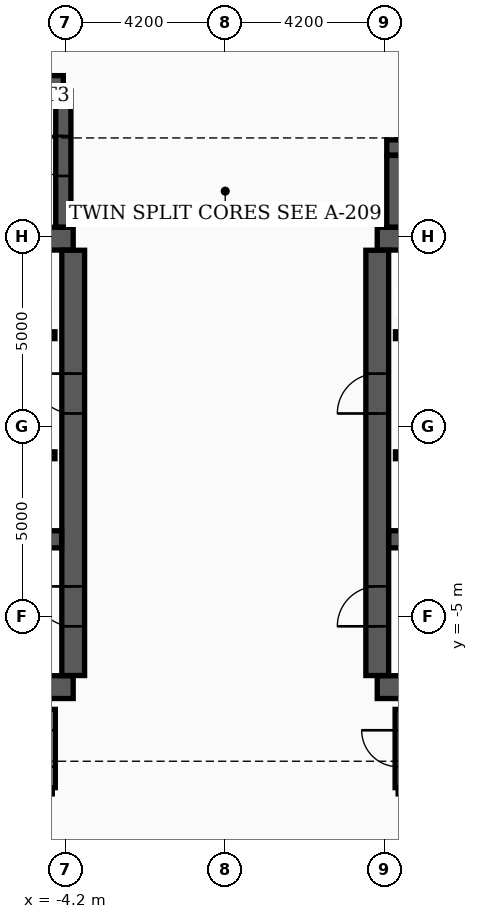
"""IFC4 building model, lengths in metres.
Left out: names, types, materials, properties, quantities, classifications, styles, units other than length and angle.
Written with IfcOpenShell. Run it as: python <this file> out.ifc"""

import sys

from ifc_helpers import new_model, si_unit, direction, frame, frame_2d, origin, place, context, subcontext, project, spatial, rectangle, extrude, element, fill, save


model = new_model("IFC4")
c1 = context("Model", 3, precision=1e-05, world=origin(), true_north=direction((0.0, 1.0)))
c2 = subcontext(c1, "Body", "Model", "MODEL_VIEW")
j1 = project(units=[si_unit("LENGTHUNIT", "METRE"), si_unit("PLANEANGLEUNIT", "RADIAN")], contexts=[c1])
p1 = place(None, origin())
s1 = spatial("IfcSite", under=j1, at=p1, CompositionType="ELEMENT")
p2 = place(p1, origin())
s2 = spatial("IfcBuilding", under=s1, at=p2, CompositionType="ELEMENT")
p3 = place(p2, frame((0.0, 0.0, 183.9)))
s3 = spatial("IfcBuildingStorey", under=s2, at=p3, CompositionType="ELEMENT", Elevation=183.9)
for number, where, z_axis, x_axis in (
    (1, (-12.4, -6.85, 0.0), (0.0, 0.0, 1.0), (1.0, 0.0, 0.0)),
    (2, (-12.4, 4.95, 0.0), (0.0, 0.0, 1.0), (1.0, 0.0, 0.0)),
):
    element("IfcWall", number, at=place(p3, frame(where, z_axis=z_axis, x_axis=x_axis)), inside=s3, PredefinedType="SHEAR", context=c2, shape_type="SweptSolid", body=[
        extrude(rectangle(XDim=8.4, YDim=0.6, at=frame_2d((4.2, 0.0))), origin(), (0.0, 0.0, 1.0), 3.7),
    ])
p4 = place(p3, frame((-4.0, -6.545, 0.0), z_axis=(0.0, 0.0, 1.0), x_axis=(0.0, 1.0, 0.0)))
e3 = element("IfcWall", 3, at=p4, inside=s3, PredefinedType="SHEAR", context=c2, shape_type="SweptSolid", body=[
    extrude(rectangle(XDim=11.19, YDim=0.6, at=frame_2d((5.595, 0.0))), origin(), (0.0, 0.0, 1.0), 3.7),
])
p5 = place(p4, frame((1.295, 0.0, 0.0)))
e4 = element("IfcOpeningElement", 4, at=p5, cuts=e3, PredefinedType="OPENING", context=c2, shape_type="SweptSolid", body=[
    extrude(rectangle(XDim=1.05, YDim=2.15, at=frame_2d((0.525, 1.075))), frame((0.0, 0.31, 0.0), z_axis=(0.0, -1.0, 0.0), x_axis=(1.0, 0.0, 0.0)), (0.0, 0.0, 1.0), 0.62),
])
p6 = place(p4, frame((6.895, 0.0, 0.0)))
e5 = element("IfcOpeningElement", 5, at=p6, cuts=e3, PredefinedType="OPENING", context=c2, shape_type="SweptSolid", body=[
    extrude(rectangle(XDim=1.05, YDim=2.15, at=frame_2d((0.525, 1.075))), frame((0.0, 0.31, 0.0), z_axis=(0.0, -1.0, 0.0), x_axis=(1.0, 0.0, 0.0)), (0.0, 0.0, 1.0), 0.62),
])
p7 = place(p3, frame((-12.095, -2.96, 0.0), z_axis=(0.0, 0.0, 1.0), x_axis=(1.0, 0.0, 0.0)))
e6 = element("IfcWall", 6, at=p7, inside=s3, PredefinedType="SHEAR", context=c2, shape_type="SweptSolid", body=[
    extrude(rectangle(XDim=7.79, YDim=0.45, at=frame_2d((3.895, 0.0))), origin(), (0.0, 0.0, 1.0), 3.7),
])
for number, where, z_axis, x_axis in (
    (7, (4.0, -6.85, 0.0), (0.0, 0.0, 1.0), (1.0, 0.0, 0.0)),
    (8, (4.0, 4.95, 0.0), (0.0, 0.0, 1.0), (1.0, 0.0, 0.0)),
):
    element("IfcWall", number, at=place(p3, frame(where, z_axis=z_axis, x_axis=x_axis)), inside=s3, PredefinedType="SHEAR", context=c2, shape_type="SweptSolid", body=[
        extrude(rectangle(XDim=8.4, YDim=0.6, at=frame_2d((4.2, 0.0))), origin(), (0.0, 0.0, 1.0), 3.7),
    ])
p8 = place(p3, frame((4.0, -6.545, 0.0), z_axis=(0.0, 0.0, 1.0), x_axis=(0.0, 1.0, 0.0)))
e9 = element("IfcWall", 9, at=p8, inside=s3, PredefinedType="SHEAR", context=c2, shape_type="SweptSolid", body=[
    extrude(rectangle(XDim=11.19, YDim=0.6, at=frame_2d((5.595, 0.0))), origin(), (0.0, 0.0, 1.0), 3.7),
])
p9 = place(p8, frame((1.295, 0.0, 0.0)))
e10 = element("IfcOpeningElement", 10, at=p9, cuts=e9, PredefinedType="OPENING", context=c2, shape_type="SweptSolid", body=[
    extrude(rectangle(XDim=1.05, YDim=2.15, at=frame_2d((0.525, 1.075))), frame((0.0, 0.31, 0.0), z_axis=(0.0, -1.0, 0.0), x_axis=(1.0, 0.0, 0.0)), (0.0, 0.0, 1.0), 0.62),
])
p10 = place(p8, frame((6.895, 0.0, 0.0)))
e11 = element("IfcOpeningElement", 11, at=p10, cuts=e9, PredefinedType="OPENING", context=c2, shape_type="SweptSolid", body=[
    extrude(rectangle(XDim=1.05, YDim=2.15, at=frame_2d((0.525, 1.075))), frame((0.0, 0.31, 0.0), z_axis=(0.0, -1.0, 0.0), x_axis=(1.0, 0.0, 0.0)), (0.0, 0.0, 1.0), 0.62),
])
p11 = place(p3, frame((4.305, -2.96, 0.0), z_axis=(0.0, 0.0, 1.0), x_axis=(1.0, 0.0, 0.0)))
e12 = element("IfcWall", 12, at=p11, inside=s3, PredefinedType="SHEAR", context=c2, shape_type="SweptSolid", body=[
    extrude(rectangle(XDim=7.79, YDim=0.45, at=frame_2d((3.895, 0.0))), origin(), (0.0, 0.0, 1.0), 3.7),
])
p12 = place(p3, frame((-12.22, 9.04, 0.0), z_axis=(0.0, 0.0, 1.0), x_axis=(1.0, 0.0, 0.0)))
e13 = element("IfcWall", 13, at=p12, inside=s3, PredefinedType="SHEAR", context=c2, shape_type="SweptSolid", body=[
    extrude(rectangle(XDim=7.96, YDim=0.4, at=frame_2d((3.98, 0.0))), origin(), (0.0, 0.0, 1.0), 3.7),
])
p13 = place(p3, frame((-4.26, 5.255, 0.0), z_axis=(0.0, 0.0, 1.0), x_axis=(0.0, 1.0, 0.0)))
e14 = element("IfcWall", 14, at=p13, inside=s3, PredefinedType="SHEAR", context=c2, shape_type="SweptSolid", body=[
    extrude(rectangle(XDim=3.58, YDim=0.4, at=frame_2d((1.79, 0.0))), origin(), (0.0, 0.0, 1.0), 3.7),
])
p14 = place(p13, frame((1.345, 0.0, 0.0)))
e15 = element("IfcOpeningElement", 15, at=p14, cuts=e14, PredefinedType="OPENING", context=c2, shape_type="SweptSolid", body=[
    extrude(rectangle(XDim=1.05, YDim=2.15, at=frame_2d((0.525, 1.075))), frame((0.0, 0.21, 0.0), z_axis=(0.0, -1.0, 0.0), x_axis=(1.0, 0.0, 0.0)), (0.0, 0.0, 1.0), 0.42),
])
p15 = place(p3, frame((4.45, 5.255, 0.0), z_axis=(0.0, 0.0, 1.0), x_axis=(0.0, 1.0, 0.0)))
e16 = element("IfcWall", 16, at=p15, inside=s3, PredefinedType="SHEAR", context=c2, shape_type="SweptSolid", body=[
    extrude(rectangle(XDim=1.885, YDim=0.4, at=frame_2d((0.942, 0.0))), origin(), (0.0, 0.0, 1.0), 3.7),
])
p16 = place(p3, frame((4.25, 7.35, 0.0), z_axis=(0.0, 0.0, 1.0), x_axis=(1.0, 0.0, 0.0)))
e17 = element("IfcWall", 17, at=p16, inside=s3, PredefinedType="SHEAR", context=c2, shape_type="SweptSolid", body=[
    extrude(rectangle(XDim=5.4, YDim=0.4, at=frame_2d((2.7, 0.0))), origin(), (0.0, 0.0, 1.0), 3.7),
])
p17 = place(p3, frame((-11.9, 2.41, 0.0), z_axis=(0.0, 0.0, 1.0), x_axis=(1.0, 0.0, 0.0)))
e18 = element("IfcWall", 18, at=p17, inside=s3, PredefinedType="SOLIDWALL", context=c2, shape_type="SweptSolid", body=[
    extrude(rectangle(XDim=7.42, YDim=0.18, at=frame_2d((3.71, 0.0))), origin(), (0.0, 0.0, 1.0), 2.96),
])
p18 = place(p17, frame((0.55, 0.0, 0.0)))
e19 = element("IfcOpeningElement", 19, at=p18, cuts=e18, PredefinedType="OPENING", context=c2, shape_type="SweptSolid", body=[
    extrude(rectangle(XDim=1.1, YDim=2.15, at=frame_2d((0.55, 1.075))), frame((0.0, 0.1, 0.0), z_axis=(0.0, -1.0, 0.0), x_axis=(1.0, 0.0, 0.0)), (0.0, 0.0, 1.0), 0.2),
])
p19 = place(p17, frame((4.9, 0.0, 0.0)))
e20 = element("IfcOpeningElement", 20, at=p19, cuts=e18, PredefinedType="OPENING", context=c2, shape_type="SweptSolid", body=[
    extrude(rectangle(XDim=0.88, YDim=2.1, at=frame_2d((0.44, 1.05))), frame((0.0, 0.1, 0.0), z_axis=(0.0, -1.0, 0.0), x_axis=(1.0, 0.0, 0.0)), (0.0, 0.0, 1.0), 0.2),
])
p20 = place(p3, frame((4.48, 2.41, 0.0), z_axis=(0.0, 0.0, 1.0), x_axis=(1.0, 0.0, 0.0)))
e21 = element("IfcWall", 21, at=p20, inside=s3, PredefinedType="SOLIDWALL", context=c2, shape_type="SweptSolid", body=[
    extrude(rectangle(XDim=7.42, YDim=0.18, at=frame_2d((3.71, 0.0))), origin(), (0.0, 0.0, 1.0), 2.96),
])
p21 = place(p20, frame((5.67, 0.0, 0.0)))
e22 = element("IfcOpeningElement", 22, at=p21, cuts=e21, PredefinedType="OPENING", context=c2, shape_type="SweptSolid", body=[
    extrude(rectangle(XDim=1.1, YDim=2.15, at=frame_2d((0.55, 1.075))), frame((0.0, 0.1, 0.0), z_axis=(0.0, -1.0, 0.0), x_axis=(1.0, 0.0, 0.0)), (0.0, 0.0, 1.0), 0.2),
])
p22 = place(p20, frame((1.6, 0.0, 0.0)))
e23 = element("IfcOpeningElement", 23, at=p22, cuts=e21, PredefinedType="OPENING", context=c2, shape_type="SweptSolid", body=[
    extrude(rectangle(XDim=0.88, YDim=2.1, at=frame_2d((0.44, 1.05))), frame((0.0, 0.1, 0.0), z_axis=(0.0, -1.0, 0.0), x_axis=(1.0, 0.0, 0.0)), (0.0, 0.0, 1.0), 0.2),
])
p23 = place(p3, frame((-11.9, -0.75, 0.0), z_axis=(0.0, 0.0, 1.0), x_axis=(1.0, 0.0, 0.0)))
e24 = element("IfcWall", 24, at=p23, inside=s3, PredefinedType="SOLIDWALL", context=c2, shape_type="SweptSolid", body=[
    extrude(rectangle(XDim=7.42, YDim=0.18, at=frame_2d((3.71, 0.0))), origin(), (0.0, 0.0, 1.0), 2.96),
])
p24 = place(p23, frame((0.45, 0.0, 0.0)))
e25 = element("IfcOpeningElement", 25, at=p24, cuts=e24, PredefinedType="OPENING", context=c2, shape_type="SweptSolid", body=[
    extrude(rectangle(XDim=1.1, YDim=2.15, at=frame_2d((0.55, 1.075))), frame((0.0, 0.1, 0.0), z_axis=(0.0, -1.0, 0.0), x_axis=(1.0, 0.0, 0.0)), (0.0, 0.0, 1.0), 0.2),
])
p25 = place(p23, frame((2.35, 0.0, 0.0)))
e26 = element("IfcOpeningElement", 26, at=p25, cuts=e24, PredefinedType="OPENING", context=c2, shape_type="SweptSolid", body=[
    extrude(rectangle(XDim=1.1, YDim=2.15, at=frame_2d((0.55, 1.075))), frame((0.0, 0.1, 0.0), z_axis=(0.0, -1.0, 0.0), x_axis=(1.0, 0.0, 0.0)), (0.0, 0.0, 1.0), 0.2),
])
p26 = place(p3, frame((4.48, -0.75, 0.0), z_axis=(0.0, 0.0, 1.0), x_axis=(1.0, 0.0, 0.0)))
e27 = element("IfcWall", 27, at=p26, inside=s3, PredefinedType="SOLIDWALL", context=c2, shape_type="SweptSolid", body=[
    extrude(rectangle(XDim=7.42, YDim=0.18, at=frame_2d((3.71, 0.0))), origin(), (0.0, 0.0, 1.0), 2.96),
])
p27 = place(p26, frame((0.52, 0.0, 0.0)))
e28 = element("IfcOpeningElement", 28, at=p27, cuts=e27, PredefinedType="OPENING", context=c2, shape_type="SweptSolid", body=[
    extrude(rectangle(XDim=1.1, YDim=2.15, at=frame_2d((0.55, 1.075))), frame((0.0, 0.1, 0.0), z_axis=(0.0, -1.0, 0.0), x_axis=(1.0, 0.0, 0.0)), (0.0, 0.0, 1.0), 0.2),
])
p28 = place(p3, frame((4.55, -9.58, 0.0), z_axis=(0.0, 0.0, 1.0), x_axis=(1.0, 0.0, 0.0)))
e29 = element("IfcWall", 29, at=p28, inside=s3, PredefinedType="PARTITIONING", context=c2, shape_type="SweptSolid", body=[
    extrude(rectangle(XDim=8.1, YDim=0.16, at=frame_2d((4.05, 0.0))), origin(), (0.0, 0.0, 1.0), 2.96),
])
p29 = place(p3, frame((4.55, -9.495, 0.0), z_axis=(0.0, 0.0, 1.0), x_axis=(0.0, 1.0, 0.0)))
e30 = element("IfcWall", 30, at=p29, inside=s3, PredefinedType="PARTITIONING", context=c2, shape_type="SweptSolid", body=[
    extrude(rectangle(XDim=2.06, YDim=0.16, at=frame_2d((1.03, 0.0))), origin(), (0.0, 0.0, 1.0), 2.96),
])
p30 = place(p29, frame((0.55, 0.0, 0.0)))
e31 = element("IfcOpeningElement", 31, at=p30, cuts=e30, PredefinedType="OPENING", context=c2, shape_type="SweptSolid", body=[
    extrude(rectangle(XDim=0.96, YDim=2.15, at=frame_2d((0.48, 1.075))), frame((0.0, 0.09, 0.0), z_axis=(0.0, -1.0, 0.0), x_axis=(1.0, 0.0, 0.0)), (0.0, 0.0, 1.0), 0.18),
])
p31 = place(p3, frame((-4.55, -9.495, 0.0), z_axis=(0.0, 0.0, 1.0), x_axis=(0.0, 1.0, 0.0)))
e32 = element("IfcWall", 32, at=p31, inside=s3, PredefinedType="PARTITIONING", context=c2, shape_type="SweptSolid", body=[
    extrude(rectangle(XDim=2.06, YDim=0.16, at=frame_2d((1.03, 0.0))), origin(), (0.0, 0.0, 1.0), 2.96),
])
p32 = place(p31, frame((0.55, 0.0, 0.0)))
e33 = element("IfcOpeningElement", 33, at=p32, cuts=e32, PredefinedType="OPENING", context=c2, shape_type="SweptSolid", body=[
    extrude(rectangle(XDim=0.96, YDim=2.15, at=frame_2d((0.48, 1.075))), frame((0.0, 0.09, 0.0), z_axis=(0.0, -1.0, 0.0), x_axis=(1.0, 0.0, 0.0)), (0.0, 0.0, 1.0), 0.18),
])
p33 = place(p5, origin())
e34 = element("IfcDoor", 34, at=p33, inside=s3, OperationType="SINGLE_SWING_RIGHT", PredefinedType="DOOR", context=c2, shape_type="SweptSolid", body=[
    extrude(rectangle(XDim=1.05, YDim=2.15, at=frame_2d((0.525, 1.075))), frame((0.0, 0.025, 0.0), z_axis=(0.0, -1.0, 0.0), x_axis=(1.0, 0.0, 0.0)), (0.0, 0.0, 1.0), 0.05),
])
fill(e4, e34)
p34 = place(p9, origin())
e35 = element("IfcDoor", 35, at=p34, inside=s3, OperationType="SINGLE_SWING_LEFT", PredefinedType="DOOR", context=c2, shape_type="SweptSolid", body=[
    extrude(rectangle(XDim=1.05, YDim=2.15, at=frame_2d((0.525, 1.075))), frame((0.0, 0.025, 0.0), z_axis=(0.0, -1.0, 0.0), x_axis=(1.0, 0.0, 0.0)), (0.0, 0.0, 1.0), 0.05),
])
fill(e10, e35)
p35 = place(p6, origin())
e36 = element("IfcDoor", 36, at=p35, inside=s3, OperationType="SINGLE_SWING_RIGHT", PredefinedType="DOOR", context=c2, shape_type="SweptSolid", body=[
    extrude(rectangle(XDim=1.05, YDim=2.15, at=frame_2d((0.525, 1.075))), frame((0.0, 0.025, 0.0), z_axis=(0.0, -1.0, 0.0), x_axis=(1.0, 0.0, 0.0)), (0.0, 0.0, 1.0), 0.05),
])
fill(e5, e36)
p36 = place(p10, origin())
e37 = element("IfcDoor", 37, at=p36, inside=s3, OperationType="SINGLE_SWING_LEFT", PredefinedType="DOOR", context=c2, shape_type="SweptSolid", body=[
    extrude(rectangle(XDim=1.05, YDim=2.15, at=frame_2d((0.525, 1.075))), frame((0.0, 0.025, 0.0), z_axis=(0.0, -1.0, 0.0), x_axis=(1.0, 0.0, 0.0)), (0.0, 0.0, 1.0), 0.05),
])
fill(e11, e37)
p37 = place(p14, origin())
e38 = element("IfcDoor", 38, at=p37, inside=s3, OperationType="SINGLE_SWING_RIGHT", PredefinedType="DOOR", context=c2, shape_type="SweptSolid", body=[
    extrude(rectangle(XDim=1.05, YDim=2.15, at=frame_2d((0.525, 1.075))), frame((0.0, 0.025, 0.0), z_axis=(0.0, -1.0, 0.0), x_axis=(1.0, 0.0, 0.0)), (0.0, 0.0, 1.0), 0.05),
])
fill(e15, e38)
p38 = place(p30, origin())
e39 = element("IfcDoor", 39, at=p38, inside=s3, OperationType="SINGLE_SWING_RIGHT", PredefinedType="DOOR", context=c2, shape_type="SweptSolid", body=[
    extrude(rectangle(XDim=0.96, YDim=2.15, at=frame_2d((0.48, 1.075))), frame((0.0, 0.025, 0.0), z_axis=(0.0, -1.0, 0.0), x_axis=(1.0, 0.0, 0.0)), (0.0, 0.0, 1.0), 0.05),
])
fill(e31, e39)
p39 = place(p32, origin())
e40 = element("IfcDoor", 40, at=p39, inside=s3, OperationType="SINGLE_SWING_LEFT", PredefinedType="DOOR", context=c2, shape_type="SweptSolid", body=[
    extrude(rectangle(XDim=0.96, YDim=2.15, at=frame_2d((0.48, 1.075))), frame((0.0, 0.025, 0.0), z_axis=(0.0, -1.0, 0.0), x_axis=(1.0, 0.0, 0.0)), (0.0, 0.0, 1.0), 0.05),
])
fill(e33, e40)
save(model, sys.argv[1])
